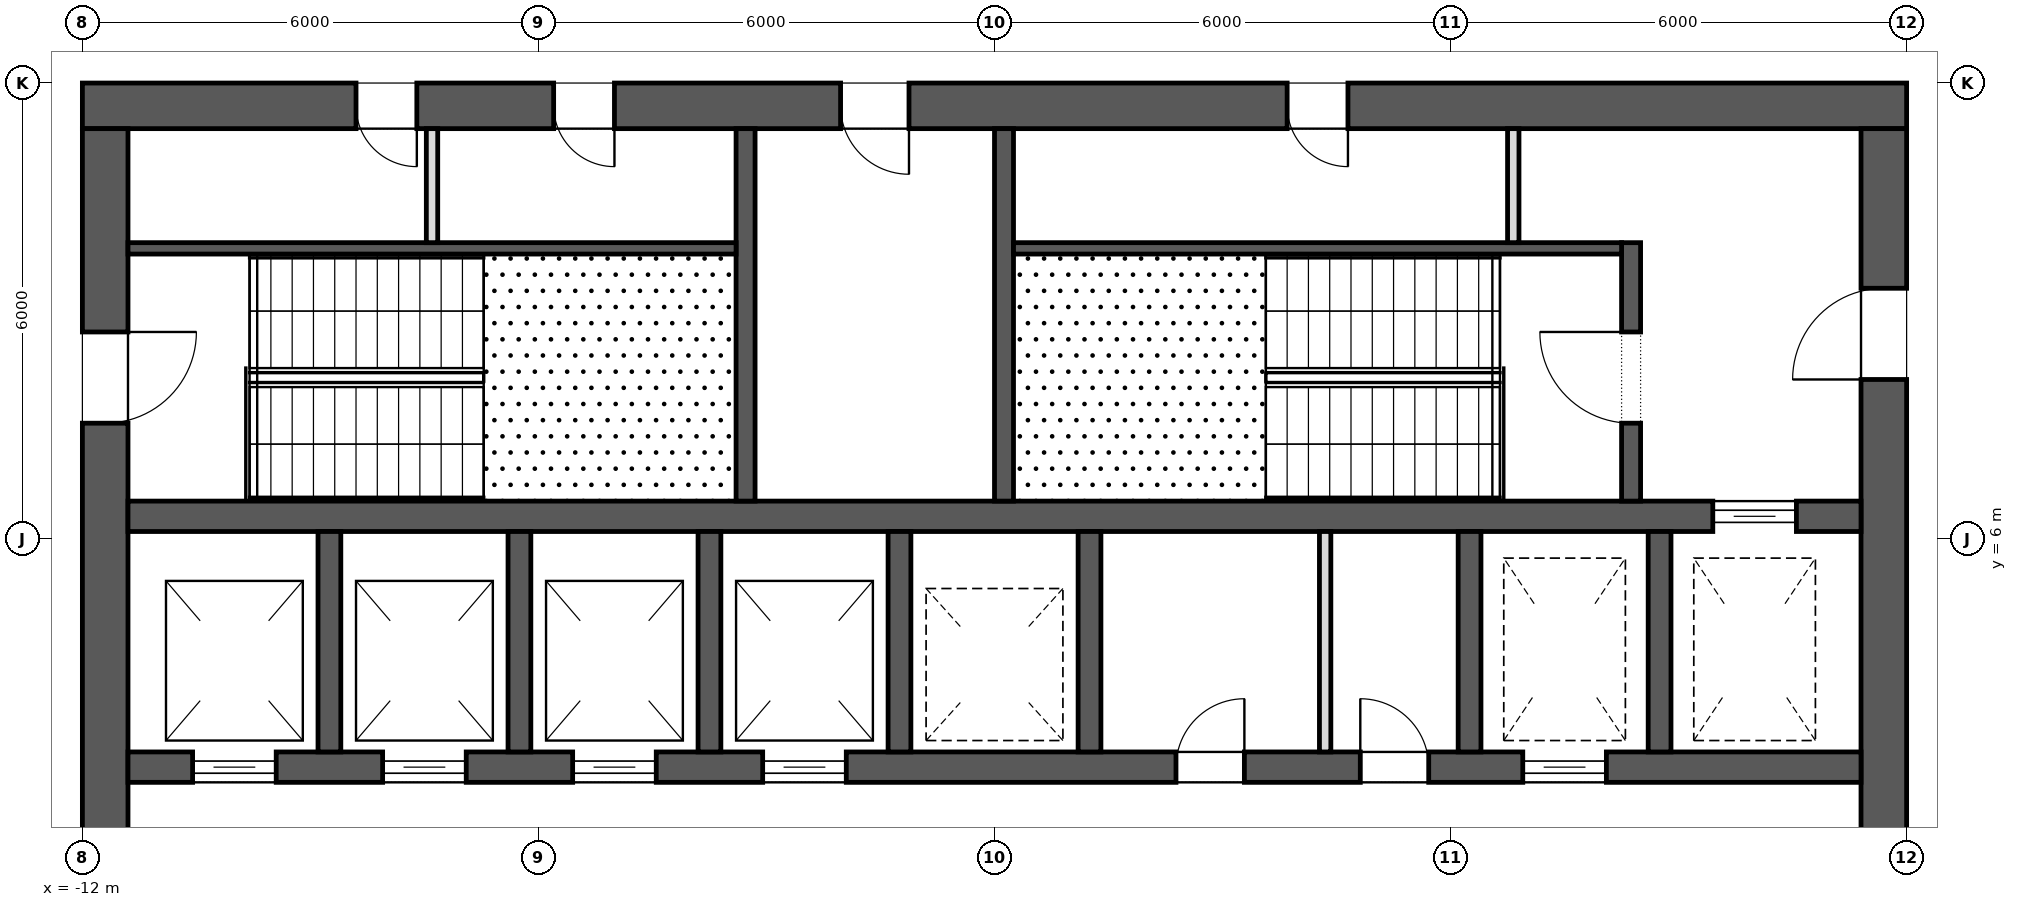
"""IFC4 building model, lengths in metres.
Left out: names, types, materials, properties, quantities, classifications, styles, units other than length and angle.
Written with IfcOpenShell. Run it as: python <this file> out.ifc"""

import sys

from ifc_helpers import new_model, si_unit, direction, frame, frame_2d, origin, place, context, subcontext, project, spatial, rectangle, extrude, element, fill, save


model = new_model("IFC4")
c1 = context("Model", 3, precision=1e-05, world=origin(), true_north=direction((0.0, 1.0)))
c2 = subcontext(c1, "Body", "Model", "MODEL_VIEW")
j1 = project(units=[si_unit("LENGTHUNIT", "METRE"), si_unit("PLANEANGLEUNIT", "RADIAN")], contexts=[c1])
p1 = place(None, origin())
s1 = spatial("IfcSite", under=j1, at=p1, CompositionType="ELEMENT")
p2 = place(p1, origin())
s2 = spatial("IfcBuilding", under=s1, at=p2, CompositionType="ELEMENT")
p3 = place(p2, frame((0.0, 0.0, 198.9)))
s3 = spatial("IfcBuildingStorey", under=s2, at=p3, CompositionType="ELEMENT", Elevation=198.9)
p4 = place(p3, frame((-12.0, 11.7, 0.0), z_axis=(0.0, 0.0, 1.0), x_axis=(1.0, 0.0, 0.0)))
e1 = element("IfcWall", 1, at=p4, inside=s3, PredefinedType="SHEAR", context=c2, shape_type="SweptSolid", body=[
    extrude(rectangle(XDim=24.0, YDim=0.6, at=frame_2d((12.0, 0.0))), origin(), (0.0, 0.0, 1.0), 4.0),
])
p5 = place(p4, frame((9.975, 0.0, 0.0)))
e2 = element("IfcOpeningElement", 2, at=p5, cuts=e1, PredefinedType="OPENING", context=c2, shape_type="SweptSolid", body=[
    extrude(rectangle(XDim=0.9, YDim=2.1, at=frame_2d((0.45, 1.05))), frame((0.0, 0.312, 0.0), z_axis=(0.0, -1.0, 0.0), x_axis=(1.0, 0.0, 0.0)), (0.0, 0.0, 1.0), 0.624),
])
p6 = place(p4, frame((3.6, 0.0, 0.0)))
e3 = element("IfcOpeningElement", 3, at=p6, cuts=e1, PredefinedType="OPENING", context=c2, shape_type="SweptSolid", body=[
    extrude(rectangle(XDim=0.8, YDim=2.1, at=frame_2d((0.4, 1.05))), frame((0.0, 0.312, 0.0), z_axis=(0.0, -1.0, 0.0), x_axis=(1.0, 0.0, 0.0)), (0.0, 0.0, 1.0), 0.624),
])
p7 = place(p4, frame((6.2, 0.0, 0.0)))
e4 = element("IfcOpeningElement", 4, at=p7, cuts=e1, PredefinedType="OPENING", context=c2, shape_type="SweptSolid", body=[
    extrude(rectangle(XDim=0.8, YDim=2.1, at=frame_2d((0.4, 1.05))), frame((0.0, 0.312, 0.0), z_axis=(0.0, -1.0, 0.0), x_axis=(1.0, 0.0, 0.0)), (0.0, 0.0, 1.0), 0.624),
])
p8 = place(p4, frame((15.85, 0.0, 0.0)))
e5 = element("IfcOpeningElement", 5, at=p8, cuts=e1, PredefinedType="OPENING", context=c2, shape_type="SweptSolid", body=[
    extrude(rectangle(XDim=0.8, YDim=2.1, at=frame_2d((0.4, 1.05))), frame((0.0, 0.312, 0.0), z_axis=(0.0, -1.0, 0.0), x_axis=(1.0, 0.0, 0.0)), (0.0, 0.0, 1.0), 0.624),
])
p9 = place(p3, frame((11.7, -11.4, 0.0), z_axis=(0.0, 0.0, 1.0), x_axis=(0.0, 1.0, 0.0)))
e6 = element("IfcWall", 6, at=p9, inside=s3, PredefinedType="SHEAR", context=c2, shape_type="SweptSolid", body=[
    extrude(rectangle(XDim=22.8, YDim=0.6, at=frame_2d((11.4, 0.0))), origin(), (0.0, 0.0, 1.0), 4.0),
])
p10 = place(p9, frame((10.2, 0.0, 0.0)))
e7 = element("IfcOpeningElement", 7, at=p10, cuts=e6, PredefinedType="OPENING", context=c2, shape_type="SweptSolid", body=[
    extrude(rectangle(XDim=2.4, YDim=2.1, at=frame_2d((1.2, 1.05))), frame((0.0, 0.312, 0.0), z_axis=(0.0, -1.0, 0.0), x_axis=(1.0, 0.0, 0.0)), (0.0, 0.0, 1.0), 0.624),
])
p11 = place(p9, frame((19.5, 0.0, 0.0)))
e8 = element("IfcOpeningElement", 8, at=p11, cuts=e6, PredefinedType="OPENING", context=c2, shape_type="SweptSolid", body=[
    extrude(rectangle(XDim=1.2, YDim=2.1, at=frame_2d((0.6, 1.05))), frame((0.0, 0.312, 0.0), z_axis=(0.0, -1.0, 0.0), x_axis=(1.0, 0.0, 0.0)), (0.0, 0.0, 1.0), 0.624),
])
p12 = place(p9, frame((2.1, 0.0, 0.0)))
e9 = element("IfcOpeningElement", 9, at=p12, cuts=e6, PredefinedType="OPENING", context=c2, shape_type="SweptSolid", body=[
    extrude(rectangle(XDim=1.2, YDim=2.1, at=frame_2d((0.6, 1.05))), frame((0.0, 0.312, 0.0), z_axis=(0.0, -1.0, 0.0), x_axis=(1.0, 0.0, 0.0)), (0.0, 0.0, 1.0), 0.624),
])
p13 = place(p3, frame((-11.7, -11.4, 0.0), z_axis=(0.0, 0.0, 1.0), x_axis=(0.0, 1.0, 0.0)))
e10 = element("IfcWall", 10, at=p13, inside=s3, PredefinedType="SHEAR", context=c2, shape_type="SweptSolid", body=[
    extrude(rectangle(XDim=22.8, YDim=0.6, at=frame_2d((11.4, 0.0))), origin(), (0.0, 0.0, 1.0), 4.0),
])
p14 = place(p13, frame((10.2, 0.0, 0.0)))
e11 = element("IfcOpeningElement", 11, at=p14, cuts=e10, PredefinedType="OPENING", context=c2, shape_type="SweptSolid", body=[
    extrude(rectangle(XDim=2.4, YDim=2.1, at=frame_2d((1.2, 1.05))), frame((0.0, 0.312, 0.0), z_axis=(0.0, -1.0, 0.0), x_axis=(1.0, 0.0, 0.0)), (0.0, 0.0, 1.0), 0.624),
])
p15 = place(p13, frame((18.925, 0.0, 0.0)))
e12 = element("IfcOpeningElement", 12, at=p15, cuts=e10, PredefinedType="OPENING", context=c2, shape_type="SweptSolid", body=[
    extrude(rectangle(XDim=1.2, YDim=2.1, at=frame_2d((0.6, 1.05))), frame((0.0, 0.312, 0.0), z_axis=(0.0, -1.0, 0.0), x_axis=(1.0, 0.0, 0.0)), (0.0, 0.0, 1.0), 0.624),
])
p16 = place(p13, frame((2.675, 0.0, 0.0)))
e13 = element("IfcOpeningElement", 13, at=p16, cuts=e10, PredefinedType="OPENING", context=c2, shape_type="SweptSolid", body=[
    extrude(rectangle(XDim=1.2, YDim=2.1, at=frame_2d((0.6, 1.05))), frame((0.0, 0.312, 0.0), z_axis=(0.0, -1.0, 0.0), x_axis=(1.0, 0.0, 0.0)), (0.0, 0.0, 1.0), 0.624),
])
p17 = place(p3, frame((-11.4, 3.0, 0.0), z_axis=(0.0, 0.0, 1.0), x_axis=(1.0, 0.0, 0.0)))
e14 = element("IfcWall", 14, at=p17, inside=s3, PredefinedType="SHEAR", context=c2, shape_type="SweptSolid", body=[
    extrude(rectangle(XDim=22.8, YDim=0.4, at=frame_2d((11.4, 0.0))), origin(), (0.0, 0.0, 1.0), 4.0),
])
p18 = place(p17, frame((0.85, 0.0, 0.0)))
e15 = element("IfcOpeningElement", 15, at=p18, cuts=e14, PredefinedType="OPENING", context=c2, shape_type="SweptSolid", body=[
    extrude(rectangle(XDim=1.1, YDim=2.1, at=frame_2d((0.55, 1.05))), frame((0.0, 0.212, 0.0), z_axis=(0.0, -1.0, 0.0), x_axis=(1.0, 0.0, 0.0)), (0.0, 0.0, 1.0), 0.424),
])
p19 = place(p17, frame((3.35, 0.0, 0.0)))
e16 = element("IfcOpeningElement", 16, at=p19, cuts=e14, PredefinedType="OPENING", context=c2, shape_type="SweptSolid", body=[
    extrude(rectangle(XDim=1.1, YDim=2.1, at=frame_2d((0.55, 1.05))), frame((0.0, 0.212, 0.0), z_axis=(0.0, -1.0, 0.0), x_axis=(1.0, 0.0, 0.0)), (0.0, 0.0, 1.0), 0.424),
])
p20 = place(p17, frame((5.85, 0.0, 0.0)))
e17 = element("IfcOpeningElement", 17, at=p20, cuts=e14, PredefinedType="OPENING", context=c2, shape_type="SweptSolid", body=[
    extrude(rectangle(XDim=1.1, YDim=2.1, at=frame_2d((0.55, 1.05))), frame((0.0, 0.212, 0.0), z_axis=(0.0, -1.0, 0.0), x_axis=(1.0, 0.0, 0.0)), (0.0, 0.0, 1.0), 0.424),
])
p21 = place(p17, frame((8.35, 0.0, 0.0)))
e18 = element("IfcOpeningElement", 18, at=p21, cuts=e14, PredefinedType="OPENING", context=c2, shape_type="SweptSolid", body=[
    extrude(rectangle(XDim=1.1, YDim=2.1, at=frame_2d((0.55, 1.05))), frame((0.0, 0.212, 0.0), z_axis=(0.0, -1.0, 0.0), x_axis=(1.0, 0.0, 0.0)), (0.0, 0.0, 1.0), 0.424),
])
p22 = place(p17, frame((18.35, 0.0, 0.0)))
e19 = element("IfcOpeningElement", 19, at=p22, cuts=e14, PredefinedType="OPENING", context=c2, shape_type="SweptSolid", body=[
    extrude(rectangle(XDim=1.1, YDim=2.1, at=frame_2d((0.55, 1.05))), frame((0.0, 0.212, 0.0), z_axis=(0.0, -1.0, 0.0), x_axis=(1.0, 0.0, 0.0)), (0.0, 0.0, 1.0), 0.424),
])
p23 = place(p17, frame((13.788, 0.0, 0.0)))
e20 = element("IfcOpeningElement", 20, at=p23, cuts=e14, PredefinedType="OPENING", context=c2, shape_type="SweptSolid", body=[
    extrude(rectangle(XDim=0.9, YDim=2.1, at=frame_2d((0.45, 1.05))), frame((0.0, 0.212, 0.0), z_axis=(0.0, -1.0, 0.0), x_axis=(1.0, 0.0, 0.0)), (0.0, 0.0, 1.0), 0.424),
])
p24 = place(p17, frame((16.212, 0.0, 0.0)))
e21 = element("IfcOpeningElement", 21, at=p24, cuts=e14, PredefinedType="OPENING", context=c2, shape_type="SweptSolid", body=[
    extrude(rectangle(XDim=0.9, YDim=2.1, at=frame_2d((0.45, 1.05))), frame((0.0, 0.212, 0.0), z_axis=(0.0, -1.0, 0.0), x_axis=(1.0, 0.0, 0.0)), (0.0, 0.0, 1.0), 0.424),
])
p25 = place(p3, frame((-11.4, 6.3, 0.0), z_axis=(0.0, 0.0, 1.0), x_axis=(1.0, 0.0, 0.0)))
e22 = element("IfcWall", 22, at=p25, inside=s3, PredefinedType="SHEAR", context=c2, shape_type="SweptSolid", body=[
    extrude(rectangle(XDim=22.8, YDim=0.4, at=frame_2d((11.4, 0.0))), origin(), (0.0, 0.0, 1.0), 4.0),
])
p26 = place(p25, frame((20.85, 0.0, 0.0)))
e23 = element("IfcOpeningElement", 23, at=p26, cuts=e22, PredefinedType="OPENING", context=c2, shape_type="SweptSolid", body=[
    extrude(rectangle(XDim=1.1, YDim=2.1, at=frame_2d((0.55, 1.05))), frame((0.0, 0.212, 0.0), z_axis=(0.0, -1.0, 0.0), x_axis=(1.0, 0.0, 0.0)), (0.0, 0.0, 1.0), 0.424),
])
for number, where, z_axis, x_axis in (
    (24, (-8.75, 3.2, 0.0), (0.0, 0.0, 1.0), (0.0, 1.0, 0.0)),
    (25, (-6.25, 3.2, 0.0), (0.0, 0.0, 1.0), (0.0, 1.0, 0.0)),
    (26, (-3.75, 3.2, 0.0), (0.0, 0.0, 1.0), (0.0, 1.0, 0.0)),
    (27, (-1.25, 3.2, 0.0), (0.0, 0.0, 1.0), (0.0, 1.0, 0.0)),
    (28, (1.25, 3.2, 0.0), (0.0, 0.0, 1.0), (0.0, 1.0, 0.0)),
    (29, (6.25, 3.2, 0.0), (0.0, 0.0, 1.0), (0.0, 1.0, 0.0)),
    (30, (8.75, 3.2, 0.0), (0.0, 0.0, 1.0), (0.0, 1.0, 0.0)),
):
    element("IfcWall", number, at=place(p3, frame(where, z_axis=z_axis, x_axis=x_axis)), inside=s3, PredefinedType="SHEAR", context=c2, shape_type="SweptSolid", body=[
        extrude(rectangle(XDim=2.9, YDim=0.3, at=frame_2d((1.45, 0.0))), origin(), (0.0, 0.0, 1.0), 4.0),
    ])
for number, where, z_axis, x_axis in (
    (31, (-3.275, 6.5, 0.0), (0.0, 0.0, 1.0), (0.0, 1.0, 0.0)),
    (32, (0.125, 6.5, 0.0), (0.0, 0.0, 1.0), (0.0, 1.0, 0.0)),
):
    element("IfcWall", number, at=place(p3, frame(where, z_axis=z_axis, x_axis=x_axis)), inside=s3, PredefinedType="SHEAR", context=c2, shape_type="SweptSolid", body=[
        extrude(rectangle(XDim=4.9, YDim=0.25, at=frame_2d((2.45, 0.0))), origin(), (0.0, 0.0, 1.0), 3.7),
    ])
p27 = place(p3, frame((8.375, 6.5, 0.0), z_axis=(0.0, 0.0, 1.0), x_axis=(0.0, 1.0, 0.0)))
e33 = element("IfcWall", 33, at=p27, inside=s3, PredefinedType="SHEAR", context=c2, shape_type="SweptSolid", body=[
    extrude(rectangle(XDim=3.4, YDim=0.25, at=frame_2d((1.7, 0.0))), origin(), (0.0, 0.0, 1.0), 3.7),
])
p28 = place(p27, frame((1.025, 0.0, 0.0)))
e34 = element("IfcOpeningElement", 34, at=p28, cuts=e33, PredefinedType="OPENING", context=c2, shape_type="SweptSolid", body=[
    extrude(rectangle(XDim=1.2, YDim=2.1, at=frame_2d((0.6, 1.05))), frame((0.0, 0.137, 0.0), z_axis=(0.0, -1.0, 0.0), x_axis=(1.0, 0.0, 0.0)), (0.0, 0.0, 1.0), 0.274),
])
for number, where, z_axis, x_axis in (
    (35, (-11.4, 9.825, 0.0), (0.0, 0.0, 1.0), (1.0, 0.0, 0.0)),
    (36, (0.25, 9.825, 0.0), (0.0, 0.0, 1.0), (1.0, 0.0, 0.0)),
):
    element("IfcWall", number, at=place(p3, frame(where, z_axis=z_axis, x_axis=x_axis)), inside=s3, PredefinedType="SHEAR", context=c2, shape_type="SweptSolid", body=[
        extrude(rectangle(XDim=8.0, YDim=0.15, at=frame_2d((4.0, 0.0))), origin(), (0.0, 0.0, 1.0), 3.7),
    ])
for number, where, z_axis, x_axis in (
    (37, (-7.4, 9.9, 0.0), (0.0, 0.0, 1.0), (0.0, 1.0, 0.0)),
    (38, (6.825, 9.9, 0.0), (0.0, 0.0, 1.0), (0.0, 1.0, 0.0)),
):
    element("IfcWall", number, at=place(p3, frame(where, z_axis=z_axis, x_axis=x_axis)), inside=s3, PredefinedType="PARTITIONING", context=c2, shape_type="SweptSolid", body=[
        extrude(rectangle(XDim=1.5, YDim=0.15, at=frame_2d((0.75, 0.0))), origin(), (0.0, 0.0, 1.0), 3.7),
    ])
p29 = place(p3, frame((4.35, 3.2, 0.0), z_axis=(0.0, 0.0, 1.0), x_axis=(0.0, 1.0, 0.0)))
e39 = element("IfcWall", 39, at=p29, inside=s3, PredefinedType="PARTITIONING", context=c2, shape_type="SweptSolid", body=[
    extrude(rectangle(XDim=2.9, YDim=0.15, at=frame_2d((1.45, 0.0))), origin(), (0.0, 0.0, 1.0), 3.7),
])
p30 = place(p26, origin())
e40 = element("IfcDoor", 40, at=p30, inside=s3, OperationType="SLIDING_TO_LEFT", PredefinedType="DOOR", context=c2, shape_type="SweptSolid", body=[
    extrude(rectangle(XDim=1.1, YDim=2.1, at=frame_2d((0.55, 1.05))), frame((0.0, 0.025, 0.0), z_axis=(0.0, -1.0, 0.0), x_axis=(1.0, 0.0, 0.0)), (0.0, 0.0, 1.0), 0.05),
])
fill(e23, e40)
p31 = place(p18, origin())
e41 = element("IfcDoor", 41, at=p31, inside=s3, OperationType="SLIDING_TO_LEFT", PredefinedType="DOOR", context=c2, shape_type="SweptSolid", body=[
    extrude(rectangle(XDim=1.1, YDim=2.1, at=frame_2d((0.55, 1.05))), frame((0.0, 0.025, 0.0), z_axis=(0.0, -1.0, 0.0), x_axis=(1.0, 0.0, 0.0)), (0.0, 0.0, 1.0), 0.05),
])
fill(e15, e41)
p32 = place(p19, origin())
e42 = element("IfcDoor", 42, at=p32, inside=s3, OperationType="SLIDING_TO_LEFT", PredefinedType="DOOR", context=c2, shape_type="SweptSolid", body=[
    extrude(rectangle(XDim=1.1, YDim=2.1, at=frame_2d((0.55, 1.05))), frame((0.0, 0.025, 0.0), z_axis=(0.0, -1.0, 0.0), x_axis=(1.0, 0.0, 0.0)), (0.0, 0.0, 1.0), 0.05),
])
fill(e16, e42)
p33 = place(p20, origin())
e43 = element("IfcDoor", 43, at=p33, inside=s3, OperationType="SLIDING_TO_LEFT", PredefinedType="DOOR", context=c2, shape_type="SweptSolid", body=[
    extrude(rectangle(XDim=1.1, YDim=2.1, at=frame_2d((0.55, 1.05))), frame((0.0, 0.025, 0.0), z_axis=(0.0, -1.0, 0.0), x_axis=(1.0, 0.0, 0.0)), (0.0, 0.0, 1.0), 0.05),
])
fill(e17, e43)
p34 = place(p21, origin())
e44 = element("IfcDoor", 44, at=p34, inside=s3, OperationType="SLIDING_TO_LEFT", PredefinedType="DOOR", context=c2, shape_type="SweptSolid", body=[
    extrude(rectangle(XDim=1.1, YDim=2.1, at=frame_2d((0.55, 1.05))), frame((0.0, 0.025, 0.0), z_axis=(0.0, -1.0, 0.0), x_axis=(1.0, 0.0, 0.0)), (0.0, 0.0, 1.0), 0.05),
])
fill(e18, e44)
p35 = place(p22, origin())
e45 = element("IfcDoor", 45, at=p35, inside=s3, OperationType="SLIDING_TO_LEFT", PredefinedType="DOOR", context=c2, shape_type="SweptSolid", body=[
    extrude(rectangle(XDim=1.1, YDim=2.1, at=frame_2d((0.55, 1.05))), frame((0.0, 0.025, 0.0), z_axis=(0.0, -1.0, 0.0), x_axis=(1.0, 0.0, 0.0)), (0.0, 0.0, 1.0), 0.05),
])
fill(e19, e45)
p36 = place(p15, frame((1.2, 0.0, 0.0), z_axis=(0.0, 0.0, 1.0), x_axis=(-1.0, 0.0, 0.0)))
e46 = element("IfcDoor", 46, at=p36, inside=s3, OperationType="SINGLE_SWING_RIGHT", PredefinedType="DOOR", context=c2, shape_type="SweptSolid", body=[
    extrude(rectangle(XDim=1.2, YDim=2.1, at=frame_2d((0.6, 1.05))), frame((0.0, 0.025, 0.0), z_axis=(0.0, -1.0, 0.0), x_axis=(1.0, 0.0, 0.0)), (0.0, 0.0, 1.0), 0.05),
])
fill(e12, e46)
p37 = place(p28, origin())
e47 = element("IfcDoor", 47, at=p37, inside=s3, OperationType="SINGLE_SWING_LEFT", PredefinedType="DOOR", context=c2, shape_type="SweptSolid", body=[
    extrude(rectangle(XDim=1.2, YDim=2.1, at=frame_2d((0.6, 1.05))), frame((0.0, 0.025, 0.0), z_axis=(0.0, -1.0, 0.0), x_axis=(1.0, 0.0, 0.0)), (0.0, 0.0, 1.0), 0.05),
])
fill(e34, e47)
p38 = place(p11, origin())
e48 = element("IfcDoor", 48, at=p38, inside=s3, OperationType="SINGLE_SWING_RIGHT", PredefinedType="DOOR", context=c2, shape_type="SweptSolid", body=[
    extrude(rectangle(XDim=1.2, YDim=2.1, at=frame_2d((0.6, 1.05))), frame((0.0, 0.025, 0.0), z_axis=(0.0, -1.0, 0.0), x_axis=(1.0, 0.0, 0.0)), (0.0, 0.0, 1.0), 0.05),
])
fill(e8, e48)
p39 = place(p5, frame((0.9, 0.0, 0.0), z_axis=(0.0, 0.0, 1.0), x_axis=(-1.0, 0.0, 0.0)))
e49 = element("IfcDoor", 49, at=p39, inside=s3, OperationType="SINGLE_SWING_RIGHT", PredefinedType="DOOR", context=c2, shape_type="SweptSolid", body=[
    extrude(rectangle(XDim=0.9, YDim=2.1, at=frame_2d((0.45, 1.05))), frame((0.0, 0.025, 0.0), z_axis=(0.0, -1.0, 0.0), x_axis=(1.0, 0.0, 0.0)), (0.0, 0.0, 1.0), 0.05),
])
fill(e2, e49)
p40 = place(p6, frame((0.8, 0.0, 0.0), z_axis=(0.0, 0.0, 1.0), x_axis=(-1.0, 0.0, 0.0)))
e50 = element("IfcDoor", 50, at=p40, inside=s3, OperationType="SINGLE_SWING_RIGHT", PredefinedType="DOOR", context=c2, shape_type="SweptSolid", body=[
    extrude(rectangle(XDim=0.8, YDim=2.1, at=frame_2d((0.4, 1.05))), frame((0.0, 0.025, 0.0), z_axis=(0.0, -1.0, 0.0), x_axis=(1.0, 0.0, 0.0)), (0.0, 0.0, 1.0), 0.05),
])
fill(e3, e50)
p41 = place(p7, frame((0.8, 0.0, 0.0), z_axis=(0.0, 0.0, 1.0), x_axis=(-1.0, 0.0, 0.0)))
e51 = element("IfcDoor", 51, at=p41, inside=s3, OperationType="SINGLE_SWING_RIGHT", PredefinedType="DOOR", context=c2, shape_type="SweptSolid", body=[
    extrude(rectangle(XDim=0.8, YDim=2.1, at=frame_2d((0.4, 1.05))), frame((0.0, 0.025, 0.0), z_axis=(0.0, -1.0, 0.0), x_axis=(1.0, 0.0, 0.0)), (0.0, 0.0, 1.0), 0.05),
])
fill(e4, e51)
p42 = place(p8, frame((0.8, 0.0, 0.0), z_axis=(0.0, 0.0, 1.0), x_axis=(-1.0, 0.0, 0.0)))
e52 = element("IfcDoor", 52, at=p42, inside=s3, OperationType="SINGLE_SWING_RIGHT", PredefinedType="DOOR", context=c2, shape_type="SweptSolid", body=[
    extrude(rectangle(XDim=0.8, YDim=2.1, at=frame_2d((0.4, 1.05))), frame((0.0, 0.025, 0.0), z_axis=(0.0, -1.0, 0.0), x_axis=(1.0, 0.0, 0.0)), (0.0, 0.0, 1.0), 0.05),
])
fill(e5, e52)
p43 = place(p23, origin())
e53 = element("IfcDoor", 53, at=p43, inside=s3, OperationType="SINGLE_SWING_LEFT", PredefinedType="DOOR", context=c2, shape_type="SweptSolid", body=[
    extrude(rectangle(XDim=0.9, YDim=2.1, at=frame_2d((0.45, 1.05))), frame((0.0, 0.025, 0.0), z_axis=(0.0, -1.0, 0.0), x_axis=(1.0, 0.0, 0.0)), (0.0, 0.0, 1.0), 0.05),
])
fill(e20, e53)
p44 = place(p24, origin())
e54 = element("IfcDoor", 54, at=p44, inside=s3, OperationType="SINGLE_SWING_RIGHT", PredefinedType="DOOR", context=c2, shape_type="SweptSolid", body=[
    extrude(rectangle(XDim=0.9, YDim=2.1, at=frame_2d((0.45, 1.05))), frame((0.0, 0.025, 0.0), z_axis=(0.0, -1.0, 0.0), x_axis=(1.0, 0.0, 0.0)), (0.0, 0.0, 1.0), 0.05),
])
fill(e21, e54)
save(model, sys.argv[1])
